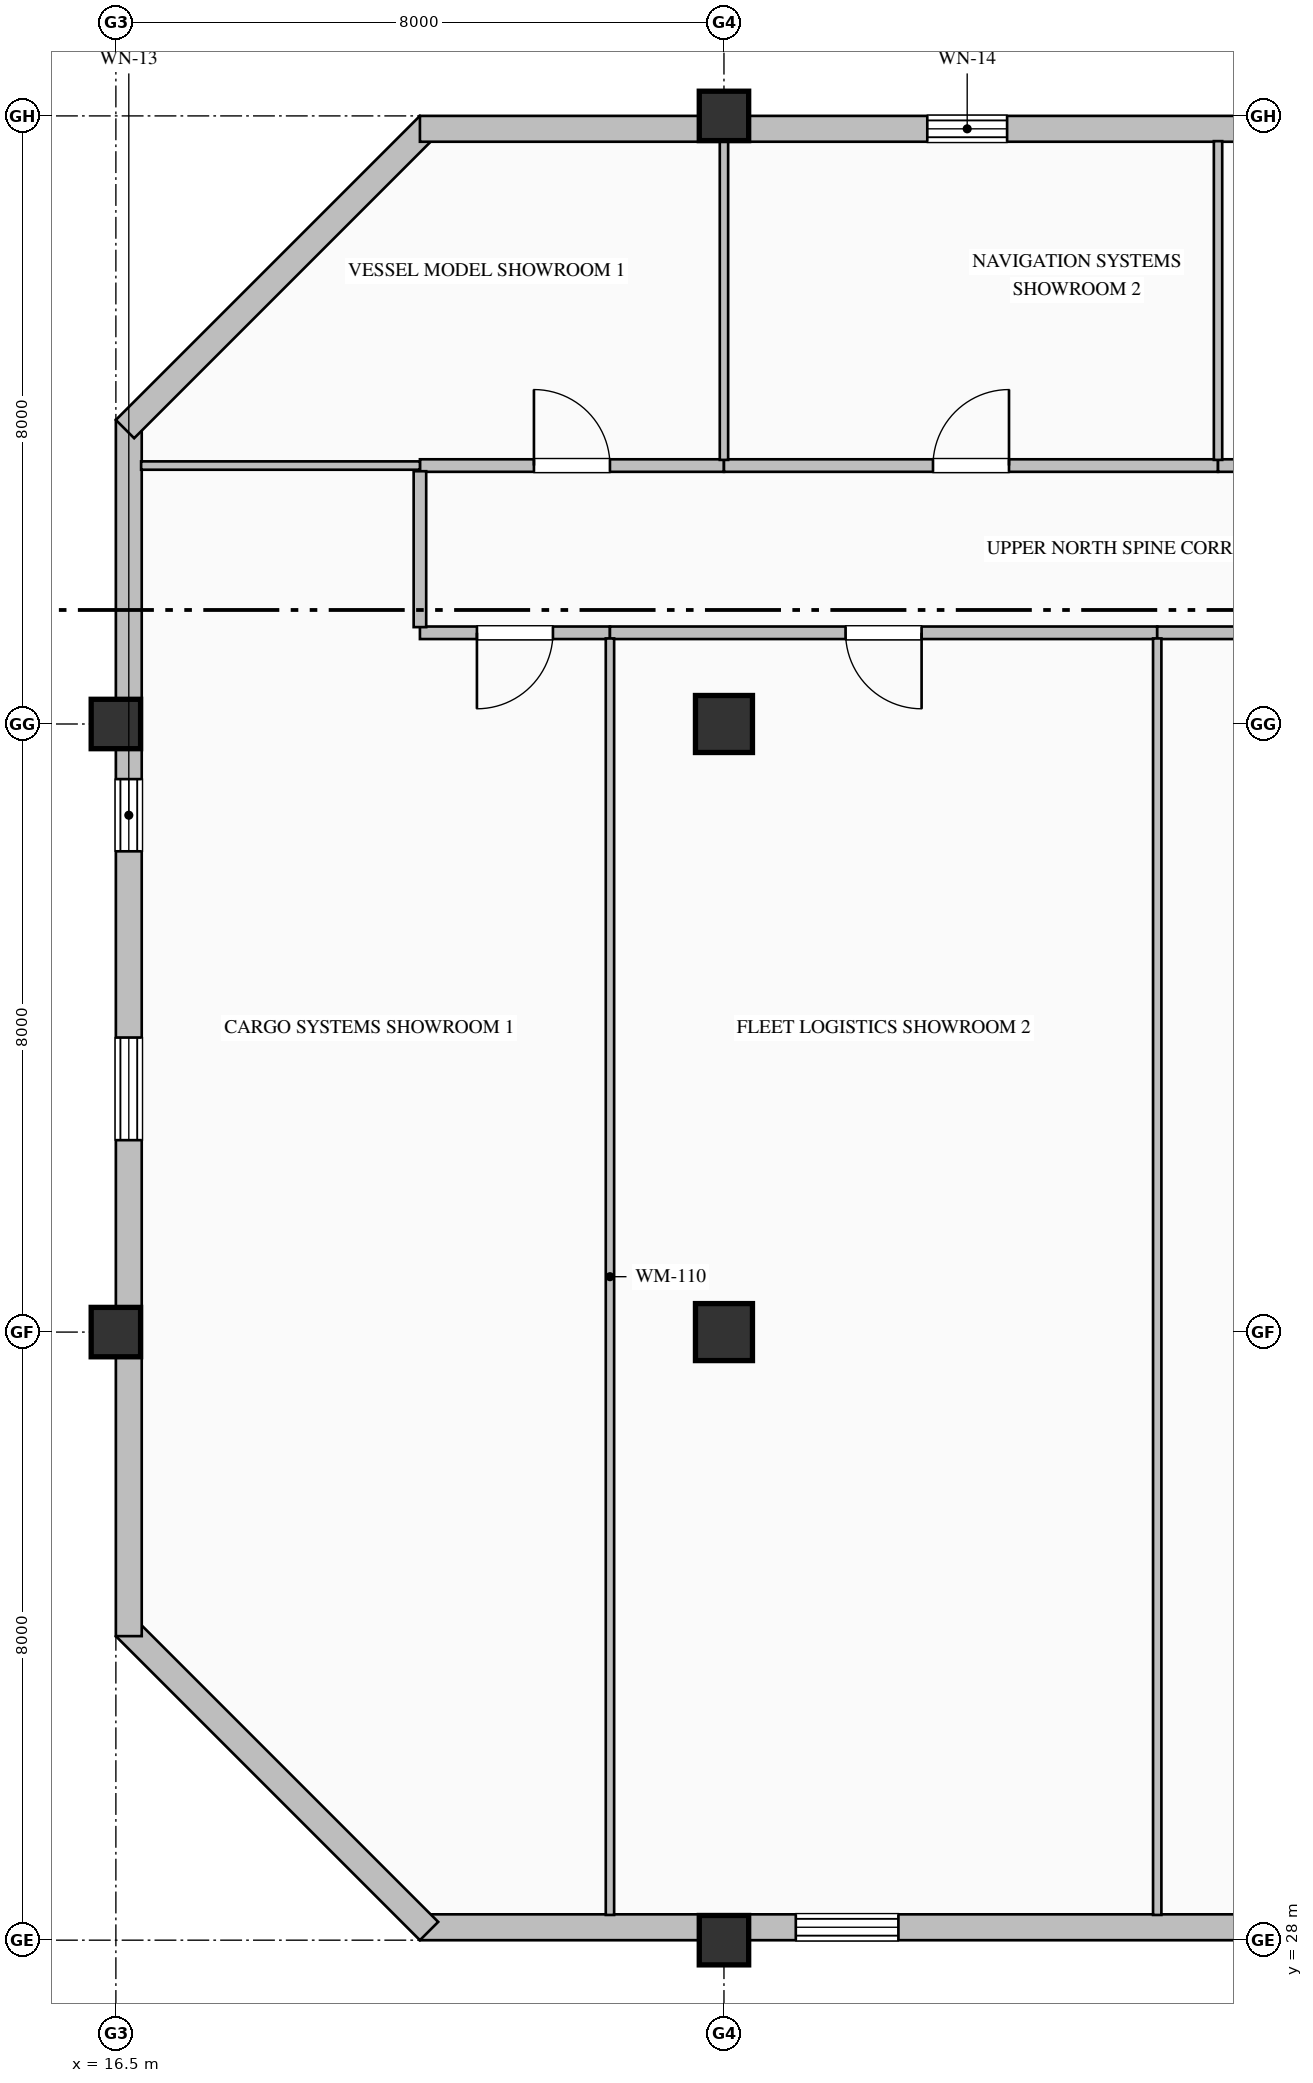
"""IFC4 building model, lengths in metres.
Left out: names, types, materials, properties, quantities, classifications, styles, units other than length and angle.
Written with IfcOpenShell. Run it as: python <this file> out.ifc"""

import sys

from ifc_helpers import new_model, si_unit, direction, frame, frame_2d, origin, origin_2d, place, context, subcontext, project, spatial, rectangle, hollow_rectangle, extrude, element, fill, save


model = new_model("IFC4")
c1 = context("Model", 3, precision=1e-05, world=origin(), true_north=direction((0.0, 1.0)))
c2 = subcontext(c1, "Body", "Model", "MODEL_VIEW")
j1 = project(units=[si_unit("LENGTHUNIT", "METRE"), si_unit("PLANEANGLEUNIT", "RADIAN")], contexts=[c1])
p1 = place(None, origin())
s1 = spatial("IfcSite", under=j1, at=p1, CompositionType="ELEMENT")
p2 = place(p1, origin())
s2 = spatial("IfcBuilding", under=s1, at=p2, CompositionType="ELEMENT")
p3 = place(p2, frame((0.0, 0.0, 351.2)))
s3 = spatial("IfcBuildingStorey", under=s2, at=p3, CompositionType="ELEMENT", Elevation=351.2)
for number, where, z_axis, x_axis in (
    (1, (16.5, 36.0, 0.0), (0.0, 0.0, 1.0), (1.0, 0.0, 0.0)),
    (2, (16.5, 44.0, 0.0), (0.0, 0.0, 1.0), (1.0, 0.0, 0.0)),
    (3, (24.5, 28.0, 0.0), (0.0, 0.0, 1.0), (1.0, 0.0, 0.0)),
):
    element("IfcColumn", number, at=place(p3, frame(where, z_axis=z_axis, x_axis=x_axis)), inside=s3, PredefinedType="COLUMN", context=c2, shape_type="SweptSolid", body=[
        extrude(hollow_rectangle(XDim=0.65, YDim=0.65, WallThickness=0.028, at=origin_2d()), origin(), (0.0, 0.0, 1.0), 4.0),
    ])
for number, where, z_axis, x_axis in (
    (4, (24.5, 36.0, 0.0), (0.0, 0.0, 1.0), (1.0, 0.0, 0.0)),
    (5, (24.5, 44.0, 0.0), (0.0, 0.0, 1.0), (1.0, 0.0, 0.0)),
):
    element("IfcColumn", number, at=place(p3, frame(where, z_axis=z_axis, x_axis=x_axis)), inside=s3, PredefinedType="COLUMN", context=c2, shape_type="SweptSolid", body=[
        extrude(rectangle(XDim=0.75, YDim=0.75, at=origin_2d()), origin(), (0.0, 0.0, 1.0), 4.0),
    ])
p4 = place(p3, frame((24.5, 52.0, 0.0), z_axis=(0.0, 0.0, 1.0), x_axis=(1.0, 0.0, 0.0)))
e6 = element("IfcColumn", 6, at=p4, inside=s3, PredefinedType="COLUMN", context=c2, shape_type="SweptSolid", body=[
    extrude(hollow_rectangle(XDim=0.65, YDim=0.65, WallThickness=0.028, at=origin_2d()), origin(), (0.0, 0.0, 1.0), 4.0),
])
p5 = place(p3, frame((40.52, 28.17, 0.0), z_axis=(0.0, 0.0, 1.0), x_axis=(-1.0, 0.0, 0.0)))
e7 = element("IfcWall", 7, at=p5, inside=s3, PredefinedType="SOLIDWALL", context=c2, shape_type="SweptSolid", body=[
    extrude(rectangle(XDim=20.02, YDim=0.34, at=frame_2d((10.01, 0.0))), origin(), (0.0, 0.0, 1.0), 3.185),
])
p6 = place(p5, frame((2.925, 0.0, 0.9)))
e8 = element("IfcOpeningElement", 8, at=p6, cuts=e7, PredefinedType="OPENING", context=c2, shape_type="SweptSolid", body=[
    extrude(rectangle(XDim=1.35, YDim=1.85, at=frame_2d((0.675, 0.925))), frame((0.0, 0.18, 0.0), z_axis=(0.0, -1.0, 0.0), x_axis=(1.0, 0.0, 0.0)), (0.0, 0.0, 1.0), 0.36),
])
p7 = place(p5, frame((13.725, 0.0, 0.9)))
e9 = element("IfcOpeningElement", 9, at=p7, cuts=e7, PredefinedType="OPENING", context=c2, shape_type="SweptSolid", body=[
    extrude(rectangle(XDim=1.35, YDim=1.85, at=frame_2d((0.675, 0.925))), frame((0.0, 0.18, 0.0), z_axis=(0.0, -1.0, 0.0), x_axis=(1.0, 0.0, 0.0)), (0.0, 0.0, 1.0), 0.36),
])
p8 = place(p3, frame((20.62, 28.12, 0.0), z_axis=(0.0, 0.0, 1.0), x_axis=(-0.707106781187, 0.707106781187, 0.0)))
e10 = element("IfcWall", 10, at=p8, inside=s3, PredefinedType="SOLIDWALL", context=c2, shape_type="SweptSolid", body=[
    extrude(rectangle(XDim=5.657, YDim=0.34, at=frame_2d((2.828, 0.0))), origin(), (0.0, 0.0, 1.0), 3.785),
])
p9 = place(p3, frame((16.67, 32.0, 0.0), z_axis=(0.0, 0.0, 1.0), x_axis=(0.0, 1.0, 0.0)))
e11 = element("IfcWall", 11, at=p9, inside=s3, PredefinedType="SOLIDWALL", context=c2, shape_type="SweptSolid", body=[
    extrude(rectangle(XDim=16.0, YDim=0.34, at=frame_2d((8.0, 0.0))), origin(), (0.0, 0.0, 1.0), 3.335),
])
p10 = place(p9, frame((6.525, 0.0, 0.9)))
e12 = element("IfcOpeningElement", 12, at=p10, cuts=e11, PredefinedType="OPENING", context=c2, shape_type="SweptSolid", body=[
    extrude(rectangle(XDim=1.35, YDim=1.85, at=frame_2d((0.675, 0.925))), frame((0.0, 0.18, 0.0), z_axis=(0.0, -1.0, 0.0), x_axis=(1.0, 0.0, 0.0)), (0.0, 0.0, 1.0), 0.36),
])
p11 = place(p9, frame((10.325, 0.0, 0.9)))
e13 = element("IfcOpeningElement", 13, at=p11, cuts=e11, PredefinedType="OPENING", context=c2, shape_type="SweptSolid", body=[
    extrude(rectangle(XDim=0.95, YDim=1.85, at=frame_2d((0.475, 0.925))), frame((0.0, 0.18, 0.0), z_axis=(0.0, -1.0, 0.0), x_axis=(1.0, 0.0, 0.0)), (0.0, 0.0, 1.0), 0.36),
])
p12 = place(p3, frame((16.62, 47.88, 0.0), z_axis=(0.0, 0.0, 1.0), x_axis=(0.707106781187, 0.707106781187, 0.0)))
e14 = element("IfcWall", 14, at=p12, inside=s3, PredefinedType="SOLIDWALL", context=c2, shape_type="SweptSolid", body=[
    extrude(rectangle(XDim=5.657, YDim=0.34, at=frame_2d((2.828, 0.0))), origin(), (0.0, 0.0, 1.0), 3.785),
])
p13 = place(p3, frame((20.5, 51.83, 0.0), z_axis=(0.0, 0.0, 1.0), x_axis=(1.0, 0.0, 0.0)))
e15 = element("IfcWall", 15, at=p13, inside=s3, PredefinedType="SOLIDWALL", context=c2, shape_type="SweptSolid", body=[
    extrude(rectangle(XDim=20.02, YDim=0.34, at=frame_2d((10.01, 0.0))), origin(), (0.0, 0.0, 1.0), 3.335),
])
p14 = place(p13, frame((6.675, 0.0, 0.8)))
e16 = element("IfcOpeningElement", 16, at=p14, cuts=e15, PredefinedType="OPENING", context=c2, shape_type="SweptSolid", body=[
    extrude(rectangle(XDim=1.05, YDim=2.15, at=frame_2d((0.525, 1.075))), frame((0.0, 0.18, 0.0), z_axis=(0.0, -1.0, 0.0), x_axis=(1.0, 0.0, 0.0)), (0.0, 0.0, 1.0), 0.36),
])
p15 = place(p3, frame((20.5, 47.4, 0.0), z_axis=(0.0, 0.0, 1.0), x_axis=(1.0, 0.0, 0.0)))
e17 = element("IfcWall", 17, at=p15, inside=s3, PredefinedType="PARTITIONING", context=c2, shape_type="SweptSolid", body=[
    extrude(rectangle(XDim=4.0, YDim=0.165, at=frame_2d((2.0, 0.0))), origin(), (0.0, 0.0, 1.0), 3.785),
])
p16 = place(p15, frame((1.5, 0.0, 0.0)))
e18 = element("IfcOpeningElement", 18, at=p16, cuts=e17, PredefinedType="OPENING", context=c2, shape_type="SweptSolid", body=[
    extrude(rectangle(XDim=1.0, YDim=2.15, at=frame_2d((0.5, 1.075))), frame((0.0, 0.093, 0.0), z_axis=(0.0, -1.0, 0.0), x_axis=(1.0, 0.0, 0.0)), (0.0, 0.0, 1.0), 0.185),
])
p17 = place(p3, frame((24.5, 47.4, 0.0), z_axis=(0.0, 0.0, 1.0), x_axis=(1.0, 0.0, 0.0)))
e19 = element("IfcWall", 19, at=p17, inside=s3, PredefinedType="PARTITIONING", context=c2, shape_type="SweptSolid", body=[
    extrude(rectangle(XDim=6.5, YDim=0.165, at=frame_2d((3.25, 0.0))), origin(), (0.0, 0.0, 1.0), 3.785),
])
p18 = place(p17, frame((2.75, 0.0, 0.0)))
e20 = element("IfcOpeningElement", 20, at=p18, cuts=e19, PredefinedType="OPENING", context=c2, shape_type="SweptSolid", body=[
    extrude(rectangle(XDim=1.0, YDim=2.15, at=frame_2d((0.5, 1.075))), frame((0.0, 0.093, 0.0), z_axis=(0.0, -1.0, 0.0), x_axis=(1.0, 0.0, 0.0)), (0.0, 0.0, 1.0), 0.185),
])
p19 = place(p3, frame((31.0, 47.4, 0.0), z_axis=(0.0, 0.0, 1.0), x_axis=(1.0, 0.0, 0.0)))
e21 = element("IfcWall", 21, at=p19, inside=s3, PredefinedType="PARTITIONING", context=c2, shape_type="SweptSolid", body=[
    extrude(rectangle(XDim=4.4, YDim=0.165, at=frame_2d((2.2, 0.0))), origin(), (0.0, 0.0, 1.0), 3.785),
])
p20 = place(p19, frame((1.7, 0.0, 0.0)))
e22 = element("IfcOpeningElement", 22, at=p20, cuts=e21, PredefinedType="OPENING", context=c2, shape_type="SweptSolid", body=[
    extrude(rectangle(XDim=1.0, YDim=2.15, at=frame_2d((0.5, 1.075))), frame((0.0, 0.093, 0.0), z_axis=(0.0, -1.0, 0.0), x_axis=(1.0, 0.0, 0.0)), (0.0, 0.0, 1.0), 0.185),
])
p21 = place(p3, frame((23.0, 45.2, 0.0), z_axis=(0.0, 0.0, 1.0), x_axis=(-1.0, 0.0, 0.0)))
e23 = element("IfcWall", 23, at=p21, inside=s3, PredefinedType="PARTITIONING", context=c2, shape_type="SweptSolid", body=[
    extrude(rectangle(XDim=2.5, YDim=0.165, at=frame_2d((1.25, 0.0))), origin(), (0.0, 0.0, 1.0), 3.785),
])
p22 = place(p21, frame((0.75, 0.0, 0.0)))
e24 = element("IfcOpeningElement", 24, at=p22, cuts=e23, PredefinedType="OPENING", context=c2, shape_type="SweptSolid", body=[
    extrude(rectangle(XDim=1.0, YDim=2.15, at=frame_2d((0.5, 1.075))), frame((0.0, 0.093, 0.0), z_axis=(0.0, -1.0, 0.0), x_axis=(1.0, 0.0, 0.0)), (0.0, 0.0, 1.0), 0.185),
])
p23 = place(p3, frame((20.5, 45.274, 0.0), z_axis=(0.0, 0.0, 1.0), x_axis=(0.0, 1.0, 0.0)))
e25 = element("IfcWall", 25, at=p23, inside=s3, PredefinedType="PARTITIONING", context=c2, shape_type="SweptSolid", body=[
    extrude(rectangle(XDim=2.051, YDim=0.165, at=frame_2d((1.025, 0.0))), origin(), (0.0, 0.0, 1.0), 3.785),
])
p24 = place(p3, frame((30.2, 45.2, 0.0), z_axis=(0.0, 0.0, 1.0), x_axis=(-1.0, 0.0, 0.0)))
e26 = element("IfcWall", 26, at=p24, inside=s3, PredefinedType="PARTITIONING", context=c2, shape_type="SweptSolid", body=[
    extrude(rectangle(XDim=7.2, YDim=0.165, at=frame_2d((3.6, 0.0))), origin(), (0.0, 0.0, 1.0), 3.785),
])
p25 = place(p24, frame((3.1, 0.0, 0.0)))
e27 = element("IfcOpeningElement", 27, at=p25, cuts=e26, PredefinedType="OPENING", context=c2, shape_type="SweptSolid", body=[
    extrude(rectangle(XDim=1.0, YDim=2.15, at=frame_2d((0.5, 1.075))), frame((0.0, 0.093, 0.0), z_axis=(0.0, -1.0, 0.0), x_axis=(1.0, 0.0, 0.0)), (0.0, 0.0, 1.0), 0.185),
])
p26 = place(p3, frame((35.4, 45.2, 0.0), z_axis=(0.0, 0.0, 1.0), x_axis=(-1.0, 0.0, 0.0)))
e28 = element("IfcWall", 28, at=p26, inside=s3, PredefinedType="PARTITIONING", context=c2, shape_type="SweptSolid", body=[
    extrude(rectangle(XDim=5.2, YDim=0.165, at=frame_2d((2.6, 0.0))), origin(), (0.0, 0.0, 1.0), 3.785),
])
p27 = place(p3, frame((24.5, 51.668, 0.0), z_axis=(0.0, 0.0, 1.0), x_axis=(0.0, -1.0, 0.0)))
e29 = element("IfcWall", 29, at=p27, inside=s3, PredefinedType="MOVABLE", context=c2, shape_type="SweptSolid", body=[
    extrude(rectangle(XDim=4.193, YDim=0.11, at=frame_2d((2.097, 0.0))), origin(), (0.0, 0.0, 1.0), 3.177),
])
p28 = place(p3, frame((20.5, 47.4, 0.0), z_axis=(0.0, 0.0, 1.0), x_axis=(-1.0, 0.0, 0.0)))
e30 = element("IfcWall", 30, at=p28, inside=s3, PredefinedType="MOVABLE", context=c2, shape_type="SweptSolid", body=[
    extrude(rectangle(XDim=3.668, YDim=0.11, at=frame_2d((1.834, 0.0))), origin(), (0.0, 0.0, 1.0), 3.785),
])
p29 = place(p3, frame((31.0, 51.668, 0.0), z_axis=(0.0, 0.0, 1.0), x_axis=(0.0, -1.0, 0.0)))
e31 = element("IfcWall", 31, at=p29, inside=s3, PredefinedType="MOVABLE", context=c2, shape_type="SweptSolid", body=[
    extrude(rectangle(XDim=4.193, YDim=0.11, at=frame_2d((2.097, 0.0))), origin(), (0.0, 0.0, 1.0), 3.785),
])
for number, where, z_axis, x_axis in (
    (32, (23.0, 45.125, 0.0), (0.0, 0.0, 1.0), (0.0, -1.0, 0.0)),
    (33, (30.2, 45.125, 0.0), (0.0, 0.0, 1.0), (0.0, -1.0, 0.0)),
):
    element("IfcWall", number, at=place(p3, frame(where, z_axis=z_axis, x_axis=x_axis)), inside=s3, PredefinedType="MOVABLE", context=c2, shape_type="SweptSolid", body=[
        extrude(rectangle(XDim=16.793, YDim=0.11, at=frame_2d((8.397, 0.0))), origin(), (0.0, 0.0, 1.0), 3.785),
    ])
p30 = place(p7, origin())
e34 = element("IfcWindow", 34, at=p30, inside=s3, PartitioningType="DOUBLE_PANEL_VERTICAL", PredefinedType="WINDOW", context=c2, shape_type="SweptSolid", body=[
    extrude(rectangle(XDim=1.35, YDim=1.85, at=frame_2d((0.675, 0.925))), frame((0.0, 0.15, 0.0), z_axis=(0.0, -1.0, 0.0), x_axis=(1.0, 0.0, 0.0)), (0.0, 0.0, 1.0), 0.06),
])
fill(e9, e34)
p31 = place(p10, origin())
e35 = element("IfcWindow", 35, at=p31, inside=s3, PartitioningType="DOUBLE_PANEL_VERTICAL", PredefinedType="WINDOW", context=c2, shape_type="SweptSolid", body=[
    extrude(rectangle(XDim=1.35, YDim=1.85, at=frame_2d((0.675, 0.925))), frame((0.0, 0.15, 0.0), z_axis=(0.0, -1.0, 0.0), x_axis=(1.0, 0.0, 0.0)), (0.0, 0.0, 1.0), 0.06),
])
fill(e12, e35)
p32 = place(p11, origin())
e36 = element("IfcWindow", 36, at=p32, inside=s3, PartitioningType="SINGLE_PANEL", PredefinedType="WINDOW", context=c2, shape_type="SweptSolid", body=[
    extrude(rectangle(XDim=0.95, YDim=1.85, at=frame_2d((0.475, 0.925))), frame((0.0, 0.15, 0.0), z_axis=(0.0, -1.0, 0.0), x_axis=(1.0, 0.0, 0.0)), (0.0, 0.0, 1.0), 0.06),
])
fill(e13, e36)
p33 = place(p14, origin())
e37 = element("IfcWindow", 37, at=p33, inside=s3, PartitioningType="SINGLE_PANEL", PredefinedType="WINDOW", context=c2, shape_type="SweptSolid", body=[
    extrude(rectangle(XDim=1.05, YDim=2.15, at=frame_2d((0.525, 1.075))), frame((0.0, 0.15, 0.0), z_axis=(0.0, -1.0, 0.0), x_axis=(1.0, 0.0, 0.0)), (0.0, 0.0, 1.0), 0.06),
])
fill(e16, e37)
p34 = place(p16, origin())
e38 = element("IfcDoor", 38, at=p34, inside=s3, OperationType="SINGLE_SWING_LEFT", PredefinedType="DOOR", context=c2, shape_type="SweptSolid", body=[
    extrude(rectangle(XDim=1.0, YDim=2.15, at=frame_2d((0.5, 1.075))), frame((0.0, 0.025, 0.0), z_axis=(0.0, -1.0, 0.0), x_axis=(1.0, 0.0, 0.0)), (0.0, 0.0, 1.0), 0.05),
])
fill(e18, e38)
p35 = place(p18, origin())
e39 = element("IfcDoor", 39, at=p35, inside=s3, OperationType="SINGLE_SWING_RIGHT", PredefinedType="DOOR", context=c2, shape_type="SweptSolid", body=[
    extrude(rectangle(XDim=1.0, YDim=2.15, at=frame_2d((0.5, 1.075))), frame((0.0, 0.025, 0.0), z_axis=(0.0, -1.0, 0.0), x_axis=(1.0, 0.0, 0.0)), (0.0, 0.0, 1.0), 0.05),
])
fill(e20, e39)
p36 = place(p22, origin())
e40 = element("IfcDoor", 40, at=p36, inside=s3, OperationType="SINGLE_SWING_RIGHT", PredefinedType="DOOR", context=c2, shape_type="SweptSolid", body=[
    extrude(rectangle(XDim=1.0, YDim=2.15, at=frame_2d((0.5, 1.075))), frame((0.0, 0.025, 0.0), z_axis=(0.0, -1.0, 0.0), x_axis=(1.0, 0.0, 0.0)), (0.0, 0.0, 1.0), 0.05),
])
fill(e24, e40)
p37 = place(p25, origin())
e41 = element("IfcDoor", 41, at=p37, inside=s3, OperationType="SINGLE_SWING_LEFT", PredefinedType="DOOR", context=c2, shape_type="SweptSolid", body=[
    extrude(rectangle(XDim=1.0, YDim=2.15, at=frame_2d((0.5, 1.075))), frame((0.0, 0.025, 0.0), z_axis=(0.0, -1.0, 0.0), x_axis=(1.0, 0.0, 0.0)), (0.0, 0.0, 1.0), 0.05),
])
fill(e27, e41)
save(model, sys.argv[1])
